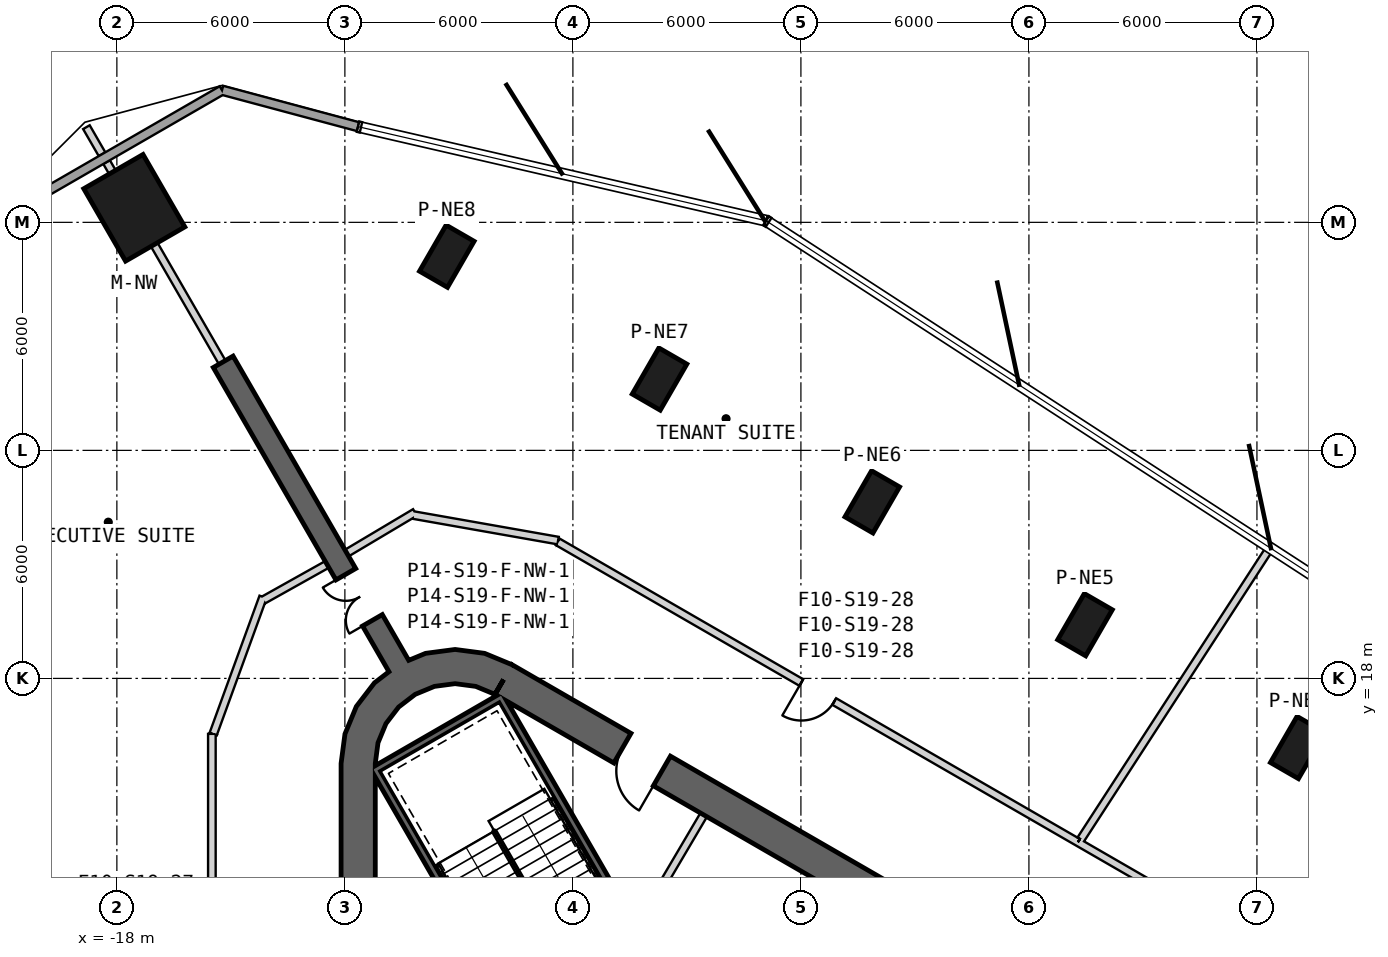
"""IFC4 building model, lengths in metres.
Left out: names, types, materials, properties, quantities, classifications, styles, units other than length and angle.
Written with IfcOpenShell. Run it as: python <this file> out.ifc"""

import sys

from ifc_helpers import new_model, si_unit, direction, frame, frame_2d, origin, origin_2d, place, context, subcontext, project, spatial, polyline, rectangle, outline, extrude, element, fill, save


model = new_model("IFC4")
c1 = context("Model", 3, precision=1e-05, world=origin(), true_north=direction((0.0, 1.0)))
c2 = subcontext(c1, "Body", "Model", "MODEL_VIEW")
j1 = project(units=[si_unit("LENGTHUNIT", "METRE"), si_unit("PLANEANGLEUNIT", "RADIAN")], contexts=[c1])
p1 = place(None, origin())
s1 = spatial("IfcSite", under=j1, at=p1, CompositionType="ELEMENT")
p2 = place(p1, origin())
s2 = spatial("IfcBuilding", under=s1, at=p2, CompositionType="ELEMENT")
p3 = place(p2, frame((0.0, 0.0, 310.4)))
s3 = spatial("IfcBuildingStorey", under=s2, at=p3, CompositionType="ELEMENT", Elevation=310.4)
p4 = place(p3, frame((-17.542, 30.383, 0.0), z_axis=(0.0, 0.0, 1.0), x_axis=(-0.5, 0.866025403784, 0.0)))
e1 = element("IfcColumn", 1, at=p4, inside=s3, PredefinedType="COLUMN", context=c2, shape_type="SweptSolid", body=[
    extrude(rectangle(XDim=2.2, YDim=1.8, at=origin_2d()), origin(), (0.0, 0.0, 1.0), 3.9),
])
for number, where, z_axis, x_axis in (
    (2, (13.074, 16.18, 0.0), (0.0, 0.0, 1.0), (0.5, 0.866, 0.0)),
    (3, (7.476, 19.412, 0.0), (0.0, 0.0, 1.0), (0.5, 0.866, 0.0)),
    (4, (1.878, 22.644, 0.0), (0.0, 0.0, 1.0), (0.5, 0.866, 0.0)),
    (5, (-3.72, 25.876, 0.0), (0.0, 0.0, 1.0), (0.5, 0.866, 0.0)),
    (6, (-9.318, 29.108, 0.0), (0.0, 0.0, 1.0), (0.5, 0.866, 0.0)),
):
    element("IfcColumn", number, at=place(p3, frame(where, z_axis=z_axis, x_axis=x_axis)), inside=s3, PredefinedType="COLUMN", context=c2, shape_type="SweptSolid", body=[
        extrude(rectangle(XDim=1.4, YDim=0.85, at=origin_2d()), origin(), (0.0, 0.0, 1.0), 3.9),
    ])
p5 = place(p3, frame((19.475, 2.208, 0.0), z_axis=(0.0, 0.0, 1.0), x_axis=(-0.866028369851, 0.499994862586, 0.0)))
e7 = element("IfcWall", 7, at=p5, inside=s3, PredefinedType="SHEAR", context=c2, shape_type="SweptSolid", body=[
    extrude(rectangle(XDim=31.523, YDim=0.9, at=frame_2d((15.762, 0.0))), origin(), (0.0, 0.0, 1.0), 3.9),
])
p6 = place(p5, frame((7.062, 0.0, 0.0)))
e8 = element("IfcOpeningElement", 8, at=p6, cuts=e7, PredefinedType="OPENING", context=c2, shape_type="SweptSolid", body=[
    extrude(rectangle(XDim=1.2, YDim=2.4, at=frame_2d((0.6, 1.2))), frame((0.0, 0.46, 0.0), z_axis=(0.0, -1.0, 0.0), x_axis=(1.0, 0.0, 0.0)), (0.0, 0.0, 1.0), 0.92),
])
p7 = place(p5, frame((3.612, 0.0, 0.0)))
e9 = element("IfcOpeningElement", 9, at=p7, cuts=e7, PredefinedType="OPENING", context=c2, shape_type="SweptSolid", body=[
    extrude(rectangle(XDim=1.2, YDim=2.4, at=frame_2d((0.6, 1.2))), frame((0.0, 0.46, 0.0), z_axis=(0.0, -1.0, 0.0), x_axis=(1.0, 0.0, 0.0)), (0.0, 0.0, 1.0), 0.92),
])
p8 = place(p5, frame((26.712, 0.0, 0.0)))
e10 = element("IfcOpeningElement", 10, at=p8, cuts=e7, PredefinedType="OPENING", context=c2, shape_type="SweptSolid", body=[
    extrude(rectangle(XDim=1.2, YDim=2.4, at=frame_2d((0.6, 1.2))), frame((0.0, 0.46, 0.0), z_axis=(0.0, -1.0, 0.0), x_axis=(1.0, 0.0, 0.0)), (0.0, 0.0, 1.0), 0.92),
])
p9 = place(p3, frame((-11.65, 15.762, 0.0), z_axis=(0.0, 0.0, 1.0), x_axis=(0.0, -1.0, 0.0)))
e11 = element("IfcWall", 11, at=p9, inside=s3, PredefinedType="SHEAR", context=c2, shape_type="SweptSolid", body=[
    extrude(rectangle(XDim=31.523, YDim=0.9, at=frame_2d((15.762, 0.0))), origin(), (0.0, 0.0, 1.0), 3.9),
])
p10 = place(p9, frame((7.062, 0.0, 0.0)))
e12 = element("IfcOpeningElement", 12, at=p10, cuts=e11, PredefinedType="OPENING", context=c2, shape_type="SweptSolid", body=[
    extrude(rectangle(XDim=1.2, YDim=2.4, at=frame_2d((0.6, 1.2))), frame((0.0, 0.46, 0.0), z_axis=(0.0, -1.0, 0.0), x_axis=(1.0, 0.0, 0.0)), (0.0, 0.0, 1.0), 0.92),
])
p11 = place(p9, frame((9.762, 0.0, 0.0)))
e13 = element("IfcOpeningElement", 13, at=p11, cuts=e11, PredefinedType="OPENING", context=c2, shape_type="SweptSolid", body=[
    extrude(rectangle(XDim=1.2, YDim=2.4, at=frame_2d((0.6, 1.2))), frame((0.0, 0.46, 0.0), z_axis=(0.0, -1.0, 0.0), x_axis=(1.0, 0.0, 0.0)), (0.0, 0.0, 1.0), 0.92),
])
p12 = place(p9, frame((12.462, 0.0, 0.0)))
e14 = element("IfcOpeningElement", 14, at=p12, cuts=e11, PredefinedType="OPENING", context=c2, shape_type="SweptSolid", body=[
    extrude(rectangle(XDim=1.2, YDim=2.4, at=frame_2d((0.6, 1.2))), frame((0.0, 0.46, 0.0), z_axis=(0.0, -1.0, 0.0), x_axis=(1.0, 0.0, 0.0)), (0.0, 0.0, 1.0), 0.92),
])
p13 = place(p9, frame((15.162, 0.0, 0.0)))
e15 = element("IfcOpeningElement", 15, at=p13, cuts=e11, PredefinedType="OPENING", context=c2, shape_type="SweptSolid", body=[
    extrude(rectangle(XDim=1.2, YDim=2.4, at=frame_2d((0.6, 1.2))), frame((0.0, 0.46, 0.0), z_axis=(0.0, -1.0, 0.0), x_axis=(1.0, 0.0, 0.0)), (0.0, 0.0, 1.0), 0.92),
])
p14 = place(p9, frame((17.862, 0.0, 0.0)))
e16 = element("IfcOpeningElement", 16, at=p14, cuts=e11, PredefinedType="OPENING", context=c2, shape_type="SweptSolid", body=[
    extrude(rectangle(XDim=1.2, YDim=2.4, at=frame_2d((0.6, 1.2))), frame((0.0, 0.46, 0.0), z_axis=(0.0, -1.0, 0.0), x_axis=(1.0, 0.0, 0.0)), (0.0, 0.0, 1.0), 0.92),
])
p15 = place(p9, frame((20.562, 0.0, 0.0)))
e17 = element("IfcOpeningElement", 17, at=p15, cuts=e11, PredefinedType="OPENING", context=c2, shape_type="SweptSolid", body=[
    extrude(rectangle(XDim=1.2, YDim=2.4, at=frame_2d((0.6, 1.2))), frame((0.0, 0.46, 0.0), z_axis=(0.0, -1.0, 0.0), x_axis=(1.0, 0.0, 0.0)), (0.0, 0.0, 1.0), 0.92),
])
p16 = place(p9, frame((23.262, 0.0, 0.0)))
e18 = element("IfcOpeningElement", 18, at=p16, cuts=e11, PredefinedType="OPENING", context=c2, shape_type="SweptSolid", body=[
    extrude(rectangle(XDim=1.2, YDim=2.4, at=frame_2d((0.6, 1.2))), frame((0.0, 0.46, 0.0), z_axis=(0.0, -1.0, 0.0), x_axis=(1.0, 0.0, 0.0)), (0.0, 0.0, 1.0), 0.92),
])
p17 = place(p9, frame((3.612, 0.0, 0.0)))
e19 = element("IfcOpeningElement", 19, at=p17, cuts=e11, PredefinedType="OPENING", context=c2, shape_type="SweptSolid", body=[
    extrude(rectangle(XDim=1.2, YDim=2.4, at=frame_2d((0.6, 1.2))), frame((0.0, 0.46, 0.0), z_axis=(0.0, -1.0, 0.0), x_axis=(1.0, 0.0, 0.0)), (0.0, 0.0, 1.0), 0.92),
])
p18 = place(p9, frame((26.712, 0.0, 0.0)))
e20 = element("IfcOpeningElement", 20, at=p18, cuts=e11, PredefinedType="OPENING", context=c2, shape_type="SweptSolid", body=[
    extrude(rectangle(XDim=1.2, YDim=2.4, at=frame_2d((0.6, 1.2))), frame((0.0, 0.46, 0.0), z_axis=(0.0, -1.0, 0.0), x_axis=(1.0, 0.0, 0.0)), (0.0, 0.0, 1.0), 0.92),
])
p19 = place(p3, origin())
e21 = element("IfcWall", 21, at=p19, inside=s3, PredefinedType="SHEAR", context=c2, shape_type="SweptSolid", body=[
    extrude(outline(polyline([(-7.6, 18.36), (-8.323, 18.659), (-9.1, 18.762), (-9.876, 18.659), (-10.6, 18.36), (-11.221, 17.883), (-11.698, 17.262), (-11.998, 16.538), (-12.1, 15.762), (-11.2, 15.762), (-11.128, 16.305), (-10.919, 16.812), (-10.585, 17.247), (-10.15, 17.58), (-9.644, 17.79), (-9.1, 17.862), (-8.556, 17.79), (-8.05, 17.58), (-7.6, 18.36)])), origin(), (0.0, 0.0, 1.0), 3.9),
])
p20 = place(p3, frame((-10.575, 18.316, 0.0), z_axis=(0.0, 0.0, 1.0), x_axis=(-0.500009446655, 0.866019949687, 0.0)))
e22 = element("IfcWall", 22, at=p20, inside=s3, PredefinedType="SHEAR", context=c2, shape_type="SweptSolid", body=[
    extrude(rectangle(XDim=9.254, YDim=0.6, at=frame_2d((4.627, 0.0))), origin(), (0.0, 0.0, 1.0), 3.9),
])
p21 = place(p20, frame((1.4, 0.0, 0.0)))
e23 = element("IfcOpeningElement", 23, at=p21, cuts=e22, PredefinedType="OPENING", context=c2, shape_type="SweptSolid", body=[
    extrude(rectangle(XDim=1.4, YDim=2.4, at=frame_2d((0.7, 1.2))), frame((0.0, 0.31, 0.0), z_axis=(0.0, -1.0, 0.0), x_axis=(1.0, 0.0, 0.0)), (0.0, 0.0, 1.0), 0.62),
])
p22 = place(p3, frame((-11.654, 32.518, 0.0), z_axis=(0.0, 0.0, 1.0), x_axis=(-0.965928052649, 0.258810736071, 0.0)))
e24 = element("IfcWall", 24, at=p22, inside=s3, PredefinedType="SOLIDWALL", context=c2, shape_type="SweptSolid", body=[
    extrude(rectangle(XDim=3.705, YDim=0.24, at=frame_2d((1.853, 0.0))), origin(), (0.0, 0.0, 1.0), 3.6),
])
p23 = place(p3, frame((-15.233, 33.477, 0.0), z_axis=(0.0, 0.0, 1.0), x_axis=(-0.866031377081, -0.499989653803, 0.0)))
e25 = element("IfcWall", 25, at=p23, inside=s3, PredefinedType="SOLIDWALL", context=c2, shape_type="SweptSolid", body=[
    extrude(rectangle(XDim=7.092, YDim=0.24, at=frame_2d((3.546, 0.0))), origin(), (0.0, 0.0, 1.0), 3.6),
])
p24 = place(p3, frame((-11.245, 15.678, -0.3), z_axis=(0.0, 0.0, 1.0), x_axis=(0.499977274689, -0.866038523851, 0.0)))
e26 = element("IfcWall", 26, at=p24, inside=s3, PredefinedType="SHEAR", context=c2, shape_type="SweptSolid", body=[
    extrude(rectangle(XDim=8.1, YDim=0.2, at=frame_2d((4.05, 0.0))), origin(), (0.0, 0.0, 1.0), 3.9),
])
p25 = place(p3, frame((-7.818, 17.541, -0.3), z_axis=(0.0, 0.0, 1.0), x_axis=(-0.866044365799, -0.499967155389, 0.0)))
e27 = element("IfcWall", 27, at=p25, inside=s3, PredefinedType="SHEAR", context=c2, shape_type="SweptSolid", body=[
    extrude(rectangle(XDim=3.8, YDim=0.2, at=frame_2d((1.9, 0.0))), origin(), (0.0, 0.0, 1.0), 3.9),
])
p26 = place(p3, frame((-7.854, 17.405, -0.3), z_axis=(0.0, 0.0, 1.0), x_axis=(0.499997992926, -0.866026562566, 0.0)))
e28 = element("IfcWall", 28, at=p26, inside=s3, PredefinedType="SHEAR", context=c2, shape_type="SweptSolid", body=[
    extrude(rectangle(XDim=7.9, YDim=0.2, at=frame_2d((3.95, 0.0))), origin(), (0.0, 0.0, 1.0), 3.9),
])
p27 = place(p3, frame((-2.558, 14.409, 0.0), z_axis=(0.0, 0.0, 1.0), x_axis=(-0.508018930956, -0.861345903683, 0.0)))
e29 = element("IfcWall", 29, at=p27, inside=s3, PredefinedType="PARTITIONING", context=c2, shape_type="SweptSolid", body=[
    extrude(rectangle(XDim=3.15, YDim=0.2, at=frame_2d((1.575, 0.0))), origin(), (0.0, 0.0, 1.0), 3.6),
])
p28 = place(p3, frame((-15.5, 16.541, 0.0), z_axis=(0.0, 0.0, 1.0), x_axis=(0.0, -1.0, 0.0)))
e30 = element("IfcWall", 30, at=p28, inside=s3, PredefinedType="PARTITIONING", context=c2, shape_type="SweptSolid", body=[
    extrude(rectangle(XDim=9.163, YDim=0.2, at=frame_2d((4.581, 0.0))), origin(), (0.0, 0.0, 1.0), 2.88),
])
p29 = place(p28, frame((4.12, 0.0, 0.0)))
e31 = element("IfcOpeningElement", 31, at=p29, cuts=e30, PredefinedType="OPENING", context=c2, shape_type="SweptSolid", body=[
    extrude(rectangle(XDim=1.0, YDim=2.1, at=frame_2d((0.5, 1.05))), frame((0.0, 0.11, 0.0), z_axis=(0.0, -1.0, 0.0), x_axis=(1.0, 0.0, 0.0)), (0.0, 0.0, 1.0), 0.22),
])
p30 = place(p3, frame((-14.152, 20.143, 0.0), z_axis=(0.0, 0.0, 1.0), x_axis=(-0.342008467257, -0.939696870445, 0.0)))
e32 = element("IfcWall", 32, at=p30, inside=s3, PredefinedType="PARTITIONING", context=c2, shape_type="SweptSolid", body=[
    extrude(rectangle(XDim=3.841, YDim=0.2, at=frame_2d((1.92, 0.0))), origin(), (0.0, 0.0, 1.0), 2.88),
])
p31 = place(p3, frame((-12.47, 20.999, 0.0), z_axis=(0.0, 0.0, 1.0), x_axis=(-0.872542788959, -0.488537697046, 0.0)))
e33 = element("IfcWall", 33, at=p31, inside=s3, PredefinedType="PARTITIONING", context=c2, shape_type="SweptSolid", body=[
    extrude(rectangle(XDim=1.925, YDim=0.2, at=frame_2d((0.962, 0.0))), origin(), (0.0, 0.0, 1.0), 3.6),
])
p32 = place(p3, frame((-10.155, 22.367, 0.0), z_axis=(0.0, 0.0, 1.0), x_axis=(-0.859343009577, -0.511399640097, 0.0)))
e34 = element("IfcWall", 34, at=p32, inside=s3, PredefinedType="PARTITIONING", context=c2, shape_type="SweptSolid", body=[
    extrude(rectangle(XDim=2.09, YDim=0.2, at=frame_2d((1.045, 0.0))), origin(), (0.0, 0.0, 1.0), 3.6),
])
p33 = place(p3, frame((-6.389, 21.626, 0.0), z_axis=(0.0, 0.0, 1.0), x_axis=(-0.984802578286, 0.173677522442, 0.0)))
e35 = element("IfcWall", 35, at=p33, inside=s3, PredefinedType="PARTITIONING", context=c2, shape_type="SweptSolid", body=[
    extrude(rectangle(XDim=3.875, YDim=0.2, at=frame_2d((1.938, 0.0))), origin(), (0.0, 0.0, 1.0), 2.88),
])
p34 = place(p3, frame((22.074, 5.153, 0.0), z_axis=(0.0, 0.0, 1.0), x_axis=(-0.866024844342, 0.500000968981, 0.0)))
e36 = element("IfcWall", 36, at=p34, inside=s3, PredefinedType="PARTITIONING", context=c2, shape_type="SweptSolid", body=[
    extrude(rectangle(XDim=17.073, YDim=0.2, at=frame_2d((8.536, 0.0))), origin(), (0.0, 0.0, 1.0), 2.88),
])
p35 = place(p34, frame((8.075, 0.0, 0.0)))
e37 = element("IfcOpeningElement", 37, at=p35, cuts=e36, PredefinedType="OPENING", context=c2, shape_type="SweptSolid", body=[
    extrude(rectangle(XDim=1.0, YDim=2.1, at=frame_2d((0.5, 1.05))), frame((0.0, 0.11, 0.0), z_axis=(0.0, -1.0, 0.0), x_axis=(1.0, 0.0, 0.0)), (0.0, 0.0, 1.0), 0.22),
])
p36 = place(p3, frame((7.289, 13.689, 0.0), z_axis=(0.0, 0.0, 1.0), x_axis=(-0.866022017938, 0.500005864412, 0.0)))
e38 = element("IfcWall", 38, at=p36, inside=s3, PredefinedType="PARTITIONING", context=c2, shape_type="SweptSolid", body=[
    extrude(rectangle(XDim=15.808, YDim=0.2, at=frame_2d((7.904, 0.0))), origin(), (0.0, 0.0, 1.0), 2.88),
])
p37 = place(p36, frame((7.404, 0.0, 0.0)))
e39 = element("IfcOpeningElement", 39, at=p37, cuts=e38, PredefinedType="OPENING", context=c2, shape_type="SweptSolid", body=[
    extrude(rectangle(XDim=1.0, YDim=2.1, at=frame_2d((0.5, 1.05))), frame((0.0, 0.11, 0.0), z_axis=(0.0, -1.0, 0.0), x_axis=(1.0, 0.0, 0.0)), (0.0, 0.0, 1.0), 0.22),
])
p38 = place(p3, frame((-18.801, 32.505, 0.0), z_axis=(0.0, 0.0, 1.0), x_axis=(0.499970888758, -0.866042210515, 0.0)))
e40 = element("IfcWall", 40, at=p38, inside=s3, PredefinedType="PARTITIONING", context=c2, shape_type="SweptSolid", body=[
    extrude(rectangle(XDim=0.822, YDim=0.2, at=frame_2d((0.411, 0.0))), origin(), (0.0, 0.0, 1.0), 3.6),
])
p39 = place(p3, frame((-18.27, 31.585, 0.0), z_axis=(0.0, 0.0, 1.0), x_axis=(0.500091252813, -0.865972712538, 0.0)))
e41 = element("IfcWall", 41, at=p39, inside=s3, PredefinedType="PARTITIONING", context=c2, shape_type="SweptSolid", body=[
    extrude(rectangle(XDim=0.306, YDim=0.2, at=frame_2d((0.153, 0.0))), origin(), (0.0, 0.0, 1.0), 3.6),
])
p40 = place(p3, frame((-17.017, 29.415, 0.0), z_axis=(0.0, 0.0, 1.0), x_axis=(0.49999800388, -0.866026556242, 0.0)))
e42 = element("IfcWall", 42, at=p40, inside=s3, PredefinedType="PARTITIONING", context=c2, shape_type="SweptSolid", body=[
    extrude(rectangle(XDim=3.579, YDim=0.2, at=frame_2d((1.79, 0.0))), origin(), (0.0, 0.0, 1.0), 3.17),
])
p41 = place(p3, frame((7.363, 13.762, 0.0), z_axis=(0.0, 0.0, 1.0), x_axis=(0.544349469572, 0.838858542888, 0.0)))
e43 = element("IfcWall", 43, at=p41, inside=s3, PredefinedType="PARTITIONING", context=c2, shape_type="SweptSolid", body=[
    extrude(rectangle(XDim=9.149, YDim=0.2, at=frame_2d((4.575, 0.0))), origin(), (0.0, 0.0, 1.0), 3.6),
])
p42 = place(p37, origin())
e44 = element("IfcDoor", 44, at=p42, inside=s3, OperationType="SINGLE_SWING_LEFT", PredefinedType="USERDEFINED", context=c2, shape_type="SweptSolid", body=[
    extrude(rectangle(XDim=1.0, YDim=2.1, at=frame_2d((0.5, 1.05))), frame((0.0, 0.025, 0.0), z_axis=(0.0, -1.0, 0.0), x_axis=(1.0, 0.0, 0.0)), (0.0, 0.0, 1.0), 0.05),
])
fill(e39, e44)
p43 = place(p8, origin())
e45 = element("IfcDoor", 45, at=p43, inside=s3, OperationType="SINGLE_SWING_LEFT", PredefinedType="USERDEFINED", context=c2, shape_type="SweptSolid", body=[
    extrude(rectangle(XDim=1.2, YDim=2.4, at=frame_2d((0.6, 1.2))), frame((0.0, 0.025, 0.0), z_axis=(0.0, -1.0, 0.0), x_axis=(1.0, 0.0, 0.0)), (0.0, 0.0, 1.0), 0.05),
])
fill(e10, e45)
p44 = place(p21, origin())
e46 = element("IfcDoor", 46, at=p44, inside=s3, OperationType="DOUBLE_DOOR_SINGLE_SWING", PredefinedType="NOTDEFINED", context=c2, shape_type="SweptSolid", body=[
    extrude(rectangle(XDim=1.4, YDim=2.4, at=frame_2d((0.7, 1.2))), frame((0.0, 0.025, 0.0), z_axis=(0.0, -1.0, 0.0), x_axis=(1.0, 0.0, 0.0)), (0.0, 0.0, 1.0), 0.05),
])
fill(e23, e46)
save(model, sys.argv[1])
